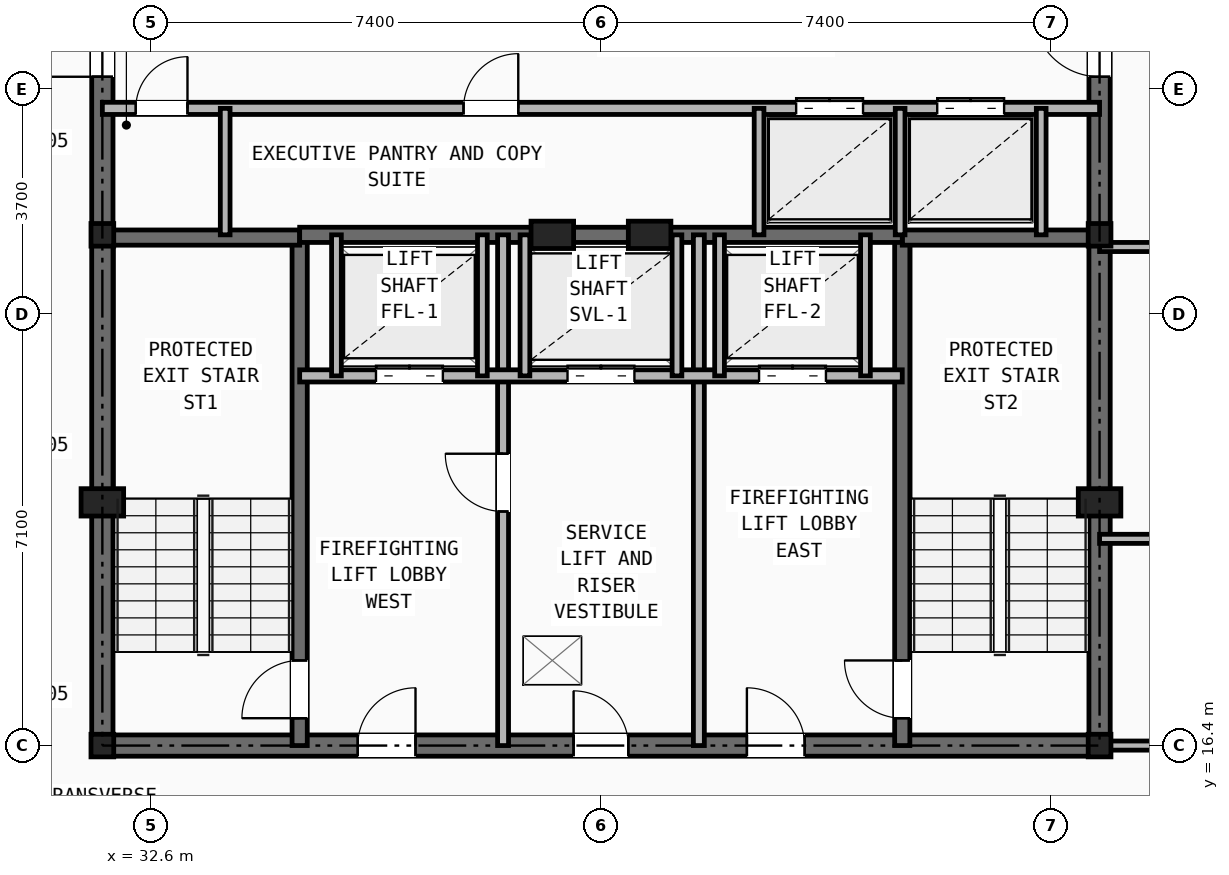
"""IFC4 building model, lengths in metres.
Left out: names, types, materials, properties, quantities, classifications, styles, units other than length and angle.
Written with IfcOpenShell. Run it as: python <this file> out.ifc"""

import sys

from ifc_helpers import new_model, si_unit, direction, frame, frame_2d, origin, origin_2d, place, context, subcontext, project, spatial, rectangle, i_section, extrude, element, fill, save


model = new_model("IFC4")
c1 = context("Model", 3, precision=1e-05, world=origin(), true_north=direction((0.0, 1.0)))
c2 = subcontext(c1, "Body", "Model", "MODEL_VIEW")
j1 = project(units=[si_unit("LENGTHUNIT", "METRE"), si_unit("PLANEANGLEUNIT", "RADIAN")], contexts=[c1])
p1 = place(None, origin())
s1 = spatial("IfcSite", under=j1, at=p1, CompositionType="ELEMENT")
p2 = place(p1, origin())
s2 = spatial("IfcBuilding", under=s1, at=p2, CompositionType="ELEMENT")
p3 = place(p2, frame((0.0, 0.0, 208.4)))
s3 = spatial("IfcBuildingStorey", under=s2, at=p3, CompositionType="ELEMENT", Elevation=208.4)
for number, where, z_axis, x_axis in (
    (1, (31.8, 16.4, 0.0), (0.0, 0.0, 1.0), (1.0, 0.0, 0.0)),
    (2, (48.2, 16.4, 0.0), (0.0, 0.0, 1.0), (1.0, 0.0, 0.0)),
    (3, (31.8, 24.8, 0.0), (0.0, 0.0, 1.0), (1.0, 0.0, 0.0)),
    (4, (48.2, 24.8, 0.0), (0.0, 0.0, 1.0), (1.0, 0.0, 0.0)),
):
    element("IfcColumn", number, at=place(p3, frame(where, z_axis=z_axis, x_axis=x_axis)), inside=s3, PredefinedType="COLUMN", context=c2, shape_type="SweptSolid", body=[
        extrude(i_section(OverallWidth=0.374, OverallDepth=0.372, WebThickness=0.016, FlangeThickness=0.026, at=origin_2d()), origin(), (0.0, 0.0, 1.0), 3.5),
    ])
for number, where, z_axis, x_axis in (
    (5, (31.8, 20.4, 0.0), (0.0, 0.0, 1.0), (1.0, 0.0, 0.0)),
    (6, (48.2, 20.4, 0.0), (0.0, 0.0, 1.0), (1.0, 0.0, 0.0)),
    (7, (39.2, 24.8, 0.0), (0.0, 0.0, 1.0), (1.0, 0.0, 0.0)),
    (8, (40.8, 24.8, 0.0), (0.0, 0.0, 1.0), (1.0, 0.0, 0.0)),
):
    element("IfcColumn", number, at=place(p3, frame(where, z_axis=z_axis, x_axis=x_axis)), inside=s3, PredefinedType="PILASTER", context=c2, shape_type="SweptSolid", body=[
        extrude(rectangle(XDim=0.7, YDim=0.45, at=origin_2d()), origin(), (0.0, 0.0, 1.0), 3.5),
    ])
p4 = place(p3, frame((31.8, 16.4, 0.0), z_axis=(0.0, 0.0, 1.0), x_axis=(1.0, 0.0, 0.0)))
e9 = element("IfcWall", 9, at=p4, inside=s3, PredefinedType="SHEAR", context=c2, shape_type="SweptSolid", body=[
    extrude(rectangle(XDim=16.4, YDim=0.35, at=frame_2d((8.2, 0.0))), origin(), (0.0, 0.0, 1.0), 3.25),
])
p5 = place(p4, frame((7.75, 0.0, 0.0)))
e10 = element("IfcOpeningElement", 10, at=p5, cuts=e9, PredefinedType="OPENING", context=c2, shape_type="SweptSolid", body=[
    extrude(rectangle(XDim=0.9, YDim=2.1, at=frame_2d((0.45, 1.05))), frame((0.0, 0.185, 0.0), z_axis=(0.0, -1.0, 0.0), x_axis=(1.0, 0.0, 0.0)), (0.0, 0.0, 1.0), 0.37),
])
p6 = place(p4, frame((4.2, 0.0, 0.0)))
e11 = element("IfcOpeningElement", 11, at=p6, cuts=e9, PredefinedType="OPENING", context=c2, shape_type="SweptSolid", body=[
    extrude(rectangle(XDim=0.95, YDim=2.1, at=frame_2d((0.475, 1.05))), frame((0.0, 0.185, 0.0), z_axis=(0.0, -1.0, 0.0), x_axis=(1.0, 0.0, 0.0)), (0.0, 0.0, 1.0), 0.37),
])
p7 = place(p4, frame((10.6, 0.0, 0.0)))
e12 = element("IfcOpeningElement", 12, at=p7, cuts=e9, PredefinedType="OPENING", context=c2, shape_type="SweptSolid", body=[
    extrude(rectangle(XDim=0.95, YDim=2.1, at=frame_2d((0.475, 1.05))), frame((0.0, 0.185, 0.0), z_axis=(0.0, -1.0, 0.0), x_axis=(1.0, 0.0, 0.0)), (0.0, 0.0, 1.0), 0.37),
])
p8 = place(p3, frame((31.8, 16.4, 0.0), z_axis=(0.0, 0.0, 1.0), x_axis=(0.0, 1.0, 0.0)))
e13 = element("IfcWall", 13, at=p8, inside=s3, PredefinedType="SHEAR", context=c2, shape_type="SweptSolid", body=[
    extrude(rectangle(XDim=14.8, YDim=0.35, at=frame_2d((7.4, 0.0))), origin(), (0.0, 0.0, 1.0), 3.25),
])
p9 = place(p8, frame((11.0, 0.0, 0.0)))
e14 = element("IfcOpeningElement", 14, at=p9, cuts=e13, PredefinedType="OPENING", context=c2, shape_type="SweptSolid", body=[
    extrude(rectangle(XDim=1.1, YDim=2.15, at=frame_2d((0.55, 1.075))), frame((0.0, 0.185, 0.0), z_axis=(0.0, -1.0, 0.0), x_axis=(1.0, 0.0, 0.0)), (0.0, 0.0, 1.0), 0.37),
])
p10 = place(p3, frame((48.2, 16.4, 0.0), z_axis=(0.0, 0.0, 1.0), x_axis=(0.0, 1.0, 0.0)))
e15 = element("IfcWall", 15, at=p10, inside=s3, PredefinedType="SHEAR", context=c2, shape_type="SweptSolid", body=[
    extrude(rectangle(XDim=14.8, YDim=0.35, at=frame_2d((7.4, 0.0))), origin(), (0.0, 0.0, 1.0), 3.25),
])
p11 = place(p10, frame((11.0, 0.0, 0.0)))
e16 = element("IfcOpeningElement", 16, at=p11, cuts=e15, PredefinedType="OPENING", context=c2, shape_type="SweptSolid", body=[
    extrude(rectangle(XDim=1.1, YDim=2.15, at=frame_2d((0.55, 1.075))), frame((0.0, 0.185, 0.0), z_axis=(0.0, -1.0, 0.0), x_axis=(1.0, 0.0, 0.0)), (0.0, 0.0, 1.0), 0.37),
])
p12 = place(p3, frame((35.045, 16.4, 0.0), z_axis=(0.0, 0.0, 1.0), x_axis=(0.0, 1.0, 0.0)))
e17 = element("IfcWall", 17, at=p12, inside=s3, PredefinedType="SHEAR", context=c2, shape_type="SweptSolid", body=[
    extrude(rectangle(XDim=8.4, YDim=0.25, at=frame_2d((4.2, 0.0))), origin(), (0.0, 0.0, 1.0), 3.25),
])
p13 = place(p12, frame((0.45, 0.0, 0.0)))
e18 = element("IfcOpeningElement", 18, at=p13, cuts=e17, PredefinedType="OPENING", context=c2, shape_type="SweptSolid", body=[
    extrude(rectangle(XDim=0.95, YDim=2.1, at=frame_2d((0.475, 1.05))), frame((0.0, 0.135, 0.0), z_axis=(0.0, -1.0, 0.0), x_axis=(1.0, 0.0, 0.0)), (0.0, 0.0, 1.0), 0.27),
])
p14 = place(p3, frame((31.8, 24.755, 0.0), z_axis=(0.0, 0.0, 1.0), x_axis=(1.0, 0.0, 0.0)))
e19 = element("IfcWall", 19, at=p14, inside=s3, PredefinedType="SHEAR", context=c2, shape_type="SweptSolid", body=[
    extrude(rectangle(XDim=3.245, YDim=0.25, at=frame_2d((1.623, 0.0))), origin(), (0.0, 0.0, 1.0), 3.25),
])
p15 = place(p3, frame((44.955, 16.4, 0.0), z_axis=(0.0, 0.0, 1.0), x_axis=(0.0, 1.0, 0.0)))
e20 = element("IfcWall", 20, at=p15, inside=s3, PredefinedType="SHEAR", context=c2, shape_type="SweptSolid", body=[
    extrude(rectangle(XDim=8.4, YDim=0.25, at=frame_2d((4.2, 0.0))), origin(), (0.0, 0.0, 1.0), 3.25),
])
p16 = place(p15, frame((0.45, 0.0, 0.0)))
e21 = element("IfcOpeningElement", 21, at=p16, cuts=e20, PredefinedType="OPENING", context=c2, shape_type="SweptSolid", body=[
    extrude(rectangle(XDim=0.95, YDim=2.1, at=frame_2d((0.475, 1.05))), frame((0.0, 0.135, 0.0), z_axis=(0.0, -1.0, 0.0), x_axis=(1.0, 0.0, 0.0)), (0.0, 0.0, 1.0), 0.27),
])
p17 = place(p3, frame((44.955, 24.755, 0.0), z_axis=(0.0, 0.0, 1.0), x_axis=(1.0, 0.0, 0.0)))
e22 = element("IfcWall", 22, at=p17, inside=s3, PredefinedType="SHEAR", context=c2, shape_type="SweptSolid", body=[
    extrude(rectangle(XDim=3.245, YDim=0.25, at=frame_2d((1.623, 0.0))), origin(), (0.0, 0.0, 1.0), 3.25),
])
p18 = place(p3, frame((35.045, 24.8, 0.0), z_axis=(0.0, 0.0, 1.0), x_axis=(1.0, 0.0, 0.0)))
e23 = element("IfcWall", 23, at=p18, inside=s3, PredefinedType="SHEAR", context=c2, shape_type="SweptSolid", body=[
    extrude(rectangle(XDim=9.91, YDim=0.25, at=frame_2d((4.955, 0.0))), origin(), (0.0, 0.0, 1.0), 3.25),
])
p19 = place(p3, frame((38.39, 16.4, 0.0), z_axis=(0.0, 0.0, 1.0), x_axis=(0.0, 1.0, 0.0)))
e24 = element("IfcWall", 24, at=p19, inside=s3, PredefinedType="PARTITIONING", context=c2, shape_type="SweptSolid", body=[
    extrude(rectangle(XDim=8.4, YDim=0.18, at=frame_2d((4.2, 0.0))), origin(), (0.0, 0.0, 1.0), 2.705),
])
p20 = place(p19, frame((3.85, 0.0, 0.0)))
e25 = element("IfcOpeningElement", 25, at=p20, cuts=e24, PredefinedType="OPENING", context=c2, shape_type="SweptSolid", body=[
    extrude(rectangle(XDim=0.95, YDim=2.1, at=frame_2d((0.475, 1.05))), frame((0.0, 0.1, 0.0), z_axis=(0.0, -1.0, 0.0), x_axis=(1.0, 0.0, 0.0)), (0.0, 0.0, 1.0), 0.2),
])
p21 = place(p3, frame((41.61, 16.4, 0.0), z_axis=(0.0, 0.0, 1.0), x_axis=(0.0, 1.0, 0.0)))
e26 = element("IfcWall", 26, at=p21, inside=s3, PredefinedType="PARTITIONING", context=c2, shape_type="SweptSolid", body=[
    extrude(rectangle(XDim=8.4, YDim=0.18, at=frame_2d((4.2, 0.0))), origin(), (0.0, 0.0, 1.0), 2.705),
])
p22 = place(p3, frame((35.045, 22.48, 0.0), z_axis=(0.0, 0.0, 1.0), x_axis=(1.0, 0.0, 0.0)))
e27 = element("IfcWall", 27, at=p22, inside=s3, PredefinedType="SOLIDWALL", context=c2, shape_type="SweptSolid", body=[
    extrude(rectangle(XDim=9.91, YDim=0.2, at=frame_2d((4.955, 0.0))), origin(), (0.0, 0.0, 1.0), 3.25),
])
p23 = place(p22, frame((1.255, 0.0, 0.0)))
e28 = element("IfcOpeningElement", 28, at=p23, cuts=e27, PredefinedType="OPENING", context=c2, shape_type="SweptSolid", body=[
    extrude(rectangle(XDim=1.1, YDim=2.15, at=frame_2d((0.55, 1.075))), frame((0.0, 0.11, 0.0), z_axis=(0.0, -1.0, 0.0), x_axis=(1.0, 0.0, 0.0)), (0.0, 0.0, 1.0), 0.22),
])
p24 = place(p22, frame((7.555, 0.0, 0.0)))
e29 = element("IfcOpeningElement", 29, at=p24, cuts=e27, PredefinedType="OPENING", context=c2, shape_type="SweptSolid", body=[
    extrude(rectangle(XDim=1.1, YDim=2.15, at=frame_2d((0.55, 1.075))), frame((0.0, 0.11, 0.0), z_axis=(0.0, -1.0, 0.0), x_axis=(1.0, 0.0, 0.0)), (0.0, 0.0, 1.0), 0.22),
])
p25 = place(p22, frame((4.405, 0.0, 0.0)))
e30 = element("IfcOpeningElement", 30, at=p25, cuts=e27, PredefinedType="OPENING", context=c2, shape_type="SweptSolid", body=[
    extrude(rectangle(XDim=1.1, YDim=2.15, at=frame_2d((0.55, 1.075))), frame((0.0, 0.11, 0.0), z_axis=(0.0, -1.0, 0.0), x_axis=(1.0, 0.0, 0.0)), (0.0, 0.0, 1.0), 0.22),
])
for number, where, z_axis, x_axis in (
    (31, (35.65, 22.48, 0.0), (0.0, 0.0, 1.0), (0.0, 1.0, 0.0)),
    (32, (38.05, 22.48, 0.0), (0.0, 0.0, 1.0), (0.0, 1.0, 0.0)),
    (33, (41.95, 22.48, 0.0), (0.0, 0.0, 1.0), (0.0, 1.0, 0.0)),
    (34, (44.35, 22.48, 0.0), (0.0, 0.0, 1.0), (0.0, 1.0, 0.0)),
    (35, (38.75, 22.48, 0.0), (0.0, 0.0, 1.0), (0.0, 1.0, 0.0)),
    (36, (41.25, 22.48, 0.0), (0.0, 0.0, 1.0), (0.0, 1.0, 0.0)),
):
    element("IfcWall", number, at=place(p3, frame(where, z_axis=z_axis, x_axis=x_axis)), inside=s3, PredefinedType="SOLIDWALL", context=c2, shape_type="SweptSolid", body=[
        extrude(rectangle(XDim=2.32, YDim=0.16, at=frame_2d((1.16, 0.0))), origin(), (0.0, 0.0, 1.0), 3.25),
    ])
p26 = place(p3, frame((31.8, 26.88, 0.0), z_axis=(0.0, 0.0, 1.0), x_axis=(1.0, 0.0, 0.0)))
e37 = element("IfcWall", 37, at=p26, inside=s3, PredefinedType="SOLIDWALL", context=c2, shape_type="SweptSolid", body=[
    extrude(rectangle(XDim=16.4, YDim=0.2, at=frame_2d((8.2, 0.0))), origin(), (0.0, 0.0, 1.0), 2.705),
])
p27 = place(p26, frame((0.55, 0.0, 0.0)))
e38 = element("IfcOpeningElement", 38, at=p27, cuts=e37, PredefinedType="OPENING", context=c2, shape_type="SweptSolid", body=[
    extrude(rectangle(XDim=0.85, YDim=2.05, at=frame_2d((0.425, 1.025))), frame((0.0, 0.11, 0.0), z_axis=(0.0, -1.0, 0.0), x_axis=(1.0, 0.0, 0.0)), (0.0, 0.0, 1.0), 0.22),
])
p28 = place(p26, frame((5.94, 0.0, 0.0)))
e39 = element("IfcOpeningElement", 39, at=p28, cuts=e37, PredefinedType="OPENING", context=c2, shape_type="SweptSolid", body=[
    extrude(rectangle(XDim=0.9, YDim=2.1, at=frame_2d((0.45, 1.05))), frame((0.0, 0.11, 0.0), z_axis=(0.0, -1.0, 0.0), x_axis=(1.0, 0.0, 0.0)), (0.0, 0.0, 1.0), 0.22),
])
p29 = place(p26, frame((11.41, 0.0, 0.0)))
e40 = element("IfcOpeningElement", 40, at=p29, cuts=e37, PredefinedType="OPENING", context=c2, shape_type="SweptSolid", body=[
    extrude(rectangle(XDim=1.1, YDim=2.15, at=frame_2d((0.55, 1.075))), frame((0.0, 0.11, 0.0), z_axis=(0.0, -1.0, 0.0), x_axis=(1.0, 0.0, 0.0)), (0.0, 0.0, 1.0), 0.22),
])
p30 = place(p26, frame((13.73, 0.0, 0.0)))
e41 = element("IfcOpeningElement", 41, at=p30, cuts=e37, PredefinedType="OPENING", context=c2, shape_type="SweptSolid", body=[
    extrude(rectangle(XDim=1.1, YDim=2.15, at=frame_2d((0.55, 1.075))), frame((0.0, 0.11, 0.0), z_axis=(0.0, -1.0, 0.0), x_axis=(1.0, 0.0, 0.0)), (0.0, 0.0, 1.0), 0.22),
])
for number, where, z_axis, x_axis in (
    (42, (33.82, 24.8, 0.0), (0.0, 0.0, 1.0), (0.0, 1.0, 0.0)),
    (43, (42.6, 24.8, 0.0), (0.0, 0.0, 1.0), (0.0, 1.0, 0.0)),
    (44, (44.92, 24.8, 0.0), (0.0, 0.0, 1.0), (0.0, 1.0, 0.0)),
    (45, (47.24, 24.8, 0.0), (0.0, 0.0, 1.0), (0.0, 1.0, 0.0)),
):
    element("IfcWall", number, at=place(p3, frame(where, z_axis=z_axis, x_axis=x_axis)), inside=s3, PredefinedType="SOLIDWALL", context=c2, shape_type="SweptSolid", body=[
        extrude(rectangle(XDim=2.08, YDim=0.16, at=frame_2d((1.04, 0.0))), origin(), (0.0, 0.0, 1.0), 3.25),
    ])
p31 = place(p3, frame((48.2, 16.4, 0.0), z_axis=(0.0, 0.0, 1.0), x_axis=(1.0, 0.0, 0.0)))
e46 = element("IfcWall", 46, at=p31, inside=s3, PredefinedType="PARTITIONING", context=c2, shape_type="SweptSolid", body=[
    extrude(rectangle(XDim=16.034, YDim=0.15, at=frame_2d((8.017, 0.0))), origin(), (0.0, 0.0, 1.0), 2.292),
])
p32 = place(p3, frame((48.2, 19.8, 0.0), z_axis=(0.0, 0.0, 1.0), x_axis=(1.0, 0.0, 0.0)))
e47 = element("IfcWall", 47, at=p32, inside=s3, PredefinedType="PARTITIONING", context=c2, shape_type="SweptSolid", body=[
    extrude(rectangle(XDim=13.736, YDim=0.15, at=frame_2d((6.868, 0.0))), origin(), (0.0, 0.0, 1.0), 2.292),
])
p33 = place(p32, frame((1.4, 0.0, 0.0)))
e48 = element("IfcOpeningElement", 48, at=p33, cuts=e47, PredefinedType="OPENING", context=c2, shape_type="SweptSolid", body=[
    extrude(rectangle(XDim=0.95, YDim=2.1, at=frame_2d((0.475, 1.05))), frame((0.0, 0.085, 0.0), z_axis=(0.0, -1.0, 0.0), x_axis=(1.0, 0.0, 0.0)), (0.0, 0.0, 1.0), 0.17),
])
p34 = place(p3, frame((48.2, 24.6, 0.0), z_axis=(0.0, 0.0, 1.0), x_axis=(1.0, 0.0, 0.0)))
e49 = element("IfcWall", 49, at=p34, inside=s3, PredefinedType="PARTITIONING", context=c2, shape_type="SweptSolid", body=[
    extrude(rectangle(XDim=10.492, YDim=0.15, at=frame_2d((5.246, 0.0))), origin(), (0.0, 0.0, 1.0), 2.628),
])
p35 = place(p34, frame((1.4, 0.0, 0.0)))
e50 = element("IfcOpeningElement", 50, at=p35, cuts=e49, PredefinedType="OPENING", context=c2, shape_type="SweptSolid", body=[
    extrude(rectangle(XDim=0.95, YDim=2.1, at=frame_2d((0.475, 1.05))), frame((0.0, 0.085, 0.0), z_axis=(0.0, -1.0, 0.0), x_axis=(1.0, 0.0, 0.0)), (0.0, 0.0, 1.0), 0.17),
])
p36 = place(p5, origin())
e51 = element("IfcDoor", 51, at=p36, inside=s3, OperationType="SINGLE_SWING_LEFT", PredefinedType="DOOR", context=c2, shape_type="SweptSolid", body=[
    extrude(rectangle(XDim=0.9, YDim=2.1, at=frame_2d((0.45, 1.05))), frame((0.0, 0.025, 0.0), z_axis=(0.0, -1.0, 0.0), x_axis=(1.0, 0.0, 0.0)), (0.0, 0.0, 1.0), 0.05),
])
fill(e10, e51)
p37 = place(p20, origin())
e52 = element("IfcDoor", 52, at=p37, inside=s3, OperationType="SINGLE_SWING_RIGHT", PredefinedType="DOOR", context=c2, shape_type="SweptSolid", body=[
    extrude(rectangle(XDim=0.95, YDim=2.1, at=frame_2d((0.475, 1.05))), frame((0.0, 0.025, 0.0), z_axis=(0.0, -1.0, 0.0), x_axis=(1.0, 0.0, 0.0)), (0.0, 0.0, 1.0), 0.05),
])
fill(e25, e52)
p38 = place(p13, origin())
e53 = element("IfcDoor", 53, at=p38, inside=s3, OperationType="SINGLE_SWING_LEFT", PredefinedType="DOOR", context=c2, shape_type="SweptSolid", body=[
    extrude(rectangle(XDim=0.95, YDim=2.1, at=frame_2d((0.475, 1.05))), frame((0.0, 0.025, 0.0), z_axis=(0.0, -1.0, 0.0), x_axis=(1.0, 0.0, 0.0)), (0.0, 0.0, 1.0), 0.05),
])
fill(e18, e53)
p39 = place(p16, origin())
e54 = element("IfcDoor", 54, at=p39, inside=s3, OperationType="SINGLE_SWING_RIGHT", PredefinedType="DOOR", context=c2, shape_type="SweptSolid", body=[
    extrude(rectangle(XDim=0.95, YDim=2.1, at=frame_2d((0.475, 1.05))), frame((0.0, 0.025, 0.0), z_axis=(0.0, -1.0, 0.0), x_axis=(1.0, 0.0, 0.0)), (0.0, 0.0, 1.0), 0.05),
])
fill(e21, e54)
p40 = place(p6, origin())
e55 = element("IfcDoor", 55, at=p40, inside=s3, OperationType="SINGLE_SWING_RIGHT", PredefinedType="DOOR", context=c2, shape_type="SweptSolid", body=[
    extrude(rectangle(XDim=0.95, YDim=2.1, at=frame_2d((0.475, 1.05))), frame((0.0, 0.025, 0.0), z_axis=(0.0, -1.0, 0.0), x_axis=(1.0, 0.0, 0.0)), (0.0, 0.0, 1.0), 0.05),
])
fill(e11, e55)
p41 = place(p7, origin())
e56 = element("IfcDoor", 56, at=p41, inside=s3, OperationType="SINGLE_SWING_LEFT", PredefinedType="DOOR", context=c2, shape_type="SweptSolid", body=[
    extrude(rectangle(XDim=0.95, YDim=2.1, at=frame_2d((0.475, 1.05))), frame((0.0, 0.025, 0.0), z_axis=(0.0, -1.0, 0.0), x_axis=(1.0, 0.0, 0.0)), (0.0, 0.0, 1.0), 0.05),
])
fill(e12, e56)
p42 = place(p23, origin())
e57 = element("IfcDoor", 57, at=p42, inside=s3, OperationType="DOUBLE_DOOR_SLIDING", PredefinedType="DOOR", context=c2, shape_type="SweptSolid", body=[
    extrude(rectangle(XDim=1.1, YDim=2.15, at=frame_2d((0.55, 1.075))), frame((0.0, 0.025, 0.0), z_axis=(0.0, -1.0, 0.0), x_axis=(1.0, 0.0, 0.0)), (0.0, 0.0, 1.0), 0.05),
])
fill(e28, e57)
p43 = place(p24, origin())
e58 = element("IfcDoor", 58, at=p43, inside=s3, OperationType="DOUBLE_DOOR_SLIDING", PredefinedType="DOOR", context=c2, shape_type="SweptSolid", body=[
    extrude(rectangle(XDim=1.1, YDim=2.15, at=frame_2d((0.55, 1.075))), frame((0.0, 0.025, 0.0), z_axis=(0.0, -1.0, 0.0), x_axis=(1.0, 0.0, 0.0)), (0.0, 0.0, 1.0), 0.05),
])
fill(e29, e58)
p44 = place(p25, origin())
e59 = element("IfcDoor", 59, at=p44, inside=s3, OperationType="DOUBLE_DOOR_SLIDING", PredefinedType="DOOR", context=c2, shape_type="SweptSolid", body=[
    extrude(rectangle(XDim=1.1, YDim=2.15, at=frame_2d((0.55, 1.075))), frame((0.0, 0.025, 0.0), z_axis=(0.0, -1.0, 0.0), x_axis=(1.0, 0.0, 0.0)), (0.0, 0.0, 1.0), 0.05),
])
fill(e30, e59)
p45 = place(p27, origin())
e60 = element("IfcDoor", 60, at=p45, inside=s3, OperationType="SINGLE_SWING_RIGHT", PredefinedType="DOOR", context=c2, shape_type="SweptSolid", body=[
    extrude(rectangle(XDim=0.85, YDim=2.05, at=frame_2d((0.425, 1.025))), frame((0.0, 0.025, 0.0), z_axis=(0.0, -1.0, 0.0), x_axis=(1.0, 0.0, 0.0)), (0.0, 0.0, 1.0), 0.05),
])
fill(e38, e60)
p46 = place(p9, origin())
e61 = element("IfcDoor", 61, at=p46, inside=s3, OperationType="SINGLE_SWING_LEFT", PredefinedType="DOOR", context=c2, shape_type="SweptSolid", body=[
    extrude(rectangle(XDim=1.1, YDim=2.15, at=frame_2d((0.55, 1.075))), frame((0.0, 0.025, 0.0), z_axis=(0.0, -1.0, 0.0), x_axis=(1.0, 0.0, 0.0)), (0.0, 0.0, 1.0), 0.05),
])
fill(e14, e61)
p47 = place(p11, origin())
e62 = element("IfcDoor", 62, at=p47, inside=s3, OperationType="SINGLE_SWING_RIGHT", PredefinedType="DOOR", context=c2, shape_type="SweptSolid", body=[
    extrude(rectangle(XDim=1.1, YDim=2.15, at=frame_2d((0.55, 1.075))), frame((0.0, 0.025, 0.0), z_axis=(0.0, -1.0, 0.0), x_axis=(1.0, 0.0, 0.0)), (0.0, 0.0, 1.0), 0.05),
])
fill(e16, e62)
p48 = place(p28, origin())
e63 = element("IfcDoor", 63, at=p48, inside=s3, OperationType="SINGLE_SWING_RIGHT", PredefinedType="DOOR", context=c2, shape_type="SweptSolid", body=[
    extrude(rectangle(XDim=0.9, YDim=2.1, at=frame_2d((0.45, 1.05))), frame((0.0, 0.025, 0.0), z_axis=(0.0, -1.0, 0.0), x_axis=(1.0, 0.0, 0.0)), (0.0, 0.0, 1.0), 0.05),
])
fill(e39, e63)
p49 = place(p29, origin())
e64 = element("IfcDoor", 64, at=p49, inside=s3, OperationType="DOUBLE_DOOR_SLIDING", PredefinedType="DOOR", context=c2, shape_type="SweptSolid", body=[
    extrude(rectangle(XDim=1.1, YDim=2.15, at=frame_2d((0.55, 1.075))), frame((0.0, 0.025, 0.0), z_axis=(0.0, -1.0, 0.0), x_axis=(1.0, 0.0, 0.0)), (0.0, 0.0, 1.0), 0.05),
])
fill(e40, e64)
p50 = place(p30, origin())
e65 = element("IfcDoor", 65, at=p50, inside=s3, OperationType="DOUBLE_DOOR_SLIDING", PredefinedType="DOOR", context=c2, shape_type="SweptSolid", body=[
    extrude(rectangle(XDim=1.1, YDim=2.15, at=frame_2d((0.55, 1.075))), frame((0.0, 0.025, 0.0), z_axis=(0.0, -1.0, 0.0), x_axis=(1.0, 0.0, 0.0)), (0.0, 0.0, 1.0), 0.05),
])
fill(e41, e65)
save(model, sys.argv[1])
